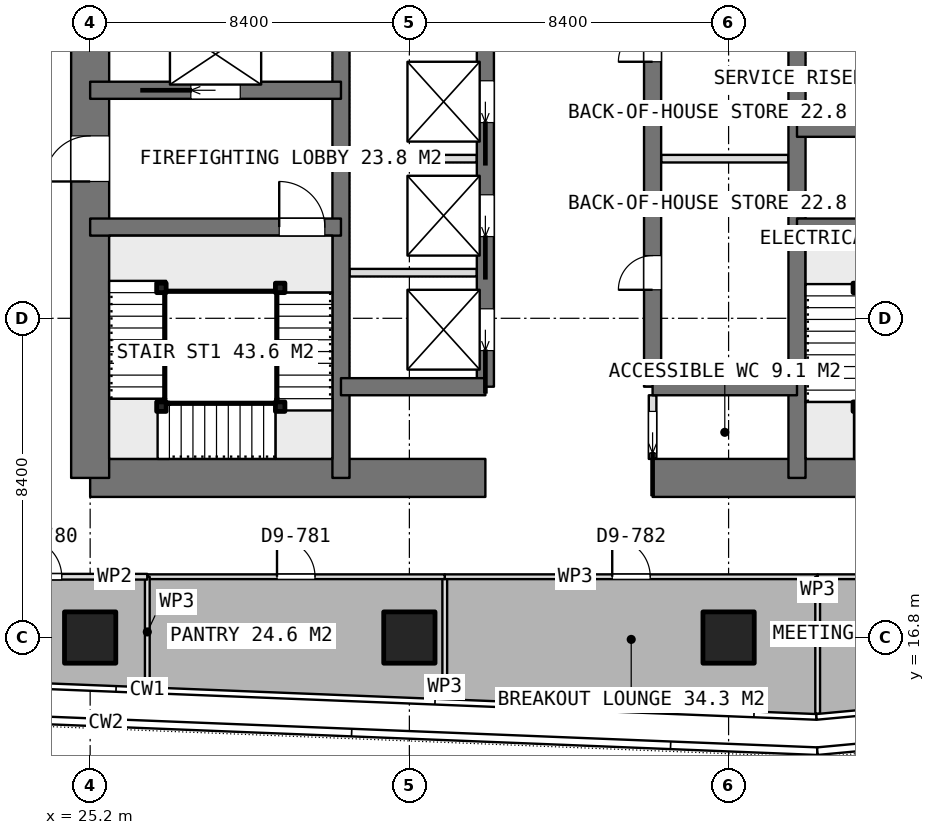
"""IFC4 building model, lengths in metres.
Left out: names, types, materials, properties, quantities, classifications, styles, units other than length and angle.
Written with IfcOpenShell. Run it as: python <this file> out.ifc"""

import sys

from ifc_helpers import new_model, si_unit, direction, frame, frame_2d, origin, origin_2d, place, context, subcontext, project, spatial, rectangle, extrude, element, fill, save


model = new_model("IFC4")
c1 = context("Model", 3, precision=1e-05, world=origin(), true_north=direction((0.0, 1.0)))
c2 = subcontext(c1, "Body", "Model", "MODEL_VIEW")
j1 = project(units=[si_unit("LENGTHUNIT", "METRE"), si_unit("PLANEANGLEUNIT", "RADIAN")], contexts=[c1])
p1 = place(None, origin())
s1 = spatial("IfcSite", under=j1, at=p1, CompositionType="ELEMENT")
p2 = place(p1, origin())
s2 = spatial("IfcBuilding", under=s1, at=p2, CompositionType="ELEMENT")
p3 = place(p2, frame((0.0, 0.0, 195.2)))
s3 = spatial("IfcBuildingStorey", under=s2, at=p3, CompositionType="ELEMENT", Elevation=195.2)
p4 = place(p3, frame((25.2, 21.0, 0.0), z_axis=(0.0, 0.0, 1.0), x_axis=(1.0, 0.0, 0.0)))
e1 = element("IfcWall", 1, at=p4, inside=s3, PredefinedType="SHEAR", context=c2, shape_type="SweptSolid", body=[
    extrude(rectangle(XDim=10.4, YDim=1.0, at=frame_2d((5.2, 0.0))), origin(), (0.0, 0.0, 1.0), 3.75),
])
p5 = place(p3, frame((40.0, 21.0, 0.0), z_axis=(0.0, 0.0, 1.0), x_axis=(1.0, 0.0, 0.0)))
e2 = element("IfcWall", 2, at=p5, inside=s3, PredefinedType="SHEAR", context=c2, shape_type="SweptSolid", body=[
    extrude(rectangle(XDim=10.4, YDim=1.0, at=frame_2d((5.2, 0.0))), origin(), (0.0, 0.0, 1.0), 3.75),
])
p6 = place(p3, frame((25.2, 21.0, 0.0), z_axis=(0.0, 0.0, 1.0), x_axis=(0.0, 1.0, 0.0)))
e3 = element("IfcWall", 3, at=p6, inside=s3, PredefinedType="SHEAR", context=c2, shape_type="SweptSolid", body=[
    extrude(rectangle(XDim=25.2, YDim=1.0, at=frame_2d((12.6, 0.0))), origin(), (0.0, 0.0, 1.0), 3.75),
])
p7 = place(p6, frame((7.8, 0.0, 0.0)))
e4 = element("IfcOpeningElement", 4, at=p7, cuts=e3, PredefinedType="OPENING", context=c2, shape_type="SweptSolid", body=[
    extrude(rectangle(XDim=1.2, YDim=2.1, at=frame_2d((0.6, 1.05))), frame((0.0, 0.51, 0.0), z_axis=(0.0, -1.0, 0.0), x_axis=(1.0, 0.0, 0.0)), (0.0, 0.0, 1.0), 1.02),
])
p8 = place(p6, frame((14.25, 0.0, 0.0)))
e5 = element("IfcOpeningElement", 5, at=p8, cuts=e3, PredefinedType="OPENING", context=c2, shape_type="SweptSolid", body=[
    extrude(rectangle(XDim=0.9, YDim=2.1, at=frame_2d((0.45, 1.05))), frame((0.0, 0.51, 0.0), z_axis=(0.0, -1.0, 0.0), x_axis=(1.0, 0.0, 0.0)), (0.0, 0.0, 1.0), 1.02),
])
p9 = place(p6, frame((16.85, 0.0, 0.0)))
e6 = element("IfcOpeningElement", 6, at=p9, cuts=e3, PredefinedType="OPENING", context=c2, shape_type="SweptSolid", body=[
    extrude(rectangle(XDim=0.9, YDim=2.1, at=frame_2d((0.45, 1.05))), frame((0.0, 0.51, 0.0), z_axis=(0.0, -1.0, 0.0), x_axis=(1.0, 0.0, 0.0)), (0.0, 0.0, 1.0), 1.02),
])
p10 = place(p6, frame((19.025, 0.0, 0.0)))
e7 = element("IfcOpeningElement", 7, at=p10, cuts=e3, PredefinedType="OPENING", context=c2, shape_type="SweptSolid", body=[
    extrude(rectangle(XDim=1.2, YDim=2.1, at=frame_2d((0.6, 1.05))), frame((0.0, 0.51, 0.0), z_axis=(0.0, -1.0, 0.0), x_axis=(1.0, 0.0, 0.0)), (0.0, 0.0, 1.0), 1.02),
])
for number, where, z_axis, x_axis in (
    (8, (31.8, 21.0, 0.0), (0.0, 0.0, 1.0), (0.0, 1.0, 0.0)),
    (9, (43.8, 21.0, 0.0), (0.0, 0.0, 1.0), (0.0, 1.0, 0.0)),
):
    element("IfcWall", number, at=place(p3, frame(where, z_axis=z_axis, x_axis=x_axis)), inside=s3, PredefinedType="SHEAR", context=c2, shape_type="SweptSolid", body=[
        extrude(rectangle(XDim=25.2, YDim=0.45, at=frame_2d((12.6, 0.0))), origin(), (0.0, 0.0, 1.0), 3.75),
    ])
p11 = place(p3, frame((35.6, 23.4, 0.0), z_axis=(0.0, 0.0, 1.0), x_axis=(0.0, 1.0, 0.0)))
e10 = element("IfcWall", 10, at=p11, inside=s3, PredefinedType="SHEAR", context=c2, shape_type="SweptSolid", body=[
    extrude(rectangle(XDim=18.0, YDim=0.45, at=frame_2d((9.0, 0.0))), origin(), (0.0, 0.0, 1.0), 3.75),
])
p12 = place(p11, frame((0.95, 0.0, 0.0)))
e11 = element("IfcOpeningElement", 11, at=p12, cuts=e10, PredefinedType="OPENING", context=c2, shape_type="SweptSolid", body=[
    extrude(rectangle(XDim=1.1, YDim=2.1, at=frame_2d((0.55, 1.05))), frame((0.0, 0.235, 0.0), z_axis=(0.0, -1.0, 0.0), x_axis=(1.0, 0.0, 0.0)), (0.0, 0.0, 1.0), 0.47),
])
p13 = place(p11, frame((3.95, 0.0, 0.0)))
e12 = element("IfcOpeningElement", 12, at=p13, cuts=e10, PredefinedType="OPENING", context=c2, shape_type="SweptSolid", body=[
    extrude(rectangle(XDim=1.1, YDim=2.1, at=frame_2d((0.55, 1.05))), frame((0.0, 0.235, 0.0), z_axis=(0.0, -1.0, 0.0), x_axis=(1.0, 0.0, 0.0)), (0.0, 0.0, 1.0), 0.47),
])
p14 = place(p11, frame((6.95, 0.0, 0.0)))
e13 = element("IfcOpeningElement", 13, at=p14, cuts=e10, PredefinedType="OPENING", context=c2, shape_type="SweptSolid", body=[
    extrude(rectangle(XDim=1.1, YDim=2.1, at=frame_2d((0.55, 1.05))), frame((0.0, 0.235, 0.0), z_axis=(0.0, -1.0, 0.0), x_axis=(1.0, 0.0, 0.0)), (0.0, 0.0, 1.0), 0.47),
])
p15 = place(p11, frame((9.95, 0.0, 0.0)))
e14 = element("IfcOpeningElement", 14, at=p15, cuts=e10, PredefinedType="OPENING", context=c2, shape_type="SweptSolid", body=[
    extrude(rectangle(XDim=1.1, YDim=2.1, at=frame_2d((0.55, 1.05))), frame((0.0, 0.235, 0.0), z_axis=(0.0, -1.0, 0.0), x_axis=(1.0, 0.0, 0.0)), (0.0, 0.0, 1.0), 0.47),
])
p16 = place(p11, frame((12.95, 0.0, 0.0)))
e15 = element("IfcOpeningElement", 15, at=p16, cuts=e10, PredefinedType="OPENING", context=c2, shape_type="SweptSolid", body=[
    extrude(rectangle(XDim=1.1, YDim=2.1, at=frame_2d((0.55, 1.05))), frame((0.0, 0.235, 0.0), z_axis=(0.0, -1.0, 0.0), x_axis=(1.0, 0.0, 0.0)), (0.0, 0.0, 1.0), 0.47),
])
p17 = place(p11, frame((15.95, 0.0, 0.0)))
e16 = element("IfcOpeningElement", 16, at=p17, cuts=e10, PredefinedType="OPENING", context=c2, shape_type="SweptSolid", body=[
    extrude(rectangle(XDim=1.1, YDim=2.1, at=frame_2d((0.55, 1.05))), frame((0.0, 0.235, 0.0), z_axis=(0.0, -1.0, 0.0), x_axis=(1.0, 0.0, 0.0)), (0.0, 0.0, 1.0), 0.47),
])
p18 = place(p3, frame((40.0, 23.4, 0.0), z_axis=(0.0, 0.0, 1.0), x_axis=(0.0, 1.0, 0.0)))
e17 = element("IfcWall", 17, at=p18, inside=s3, PredefinedType="SHEAR", context=c2, shape_type="SweptSolid", body=[
    extrude(rectangle(XDim=18.0, YDim=0.45, at=frame_2d((9.0, 0.0))), origin(), (0.0, 0.0, 1.0), 3.75),
])
p19 = place(p18, frame((2.55, 0.0, 0.0)))
e18 = element("IfcOpeningElement", 18, at=p19, cuts=e17, PredefinedType="OPENING", context=c2, shape_type="SweptSolid", body=[
    extrude(rectangle(XDim=0.9, YDim=2.1, at=frame_2d((0.45, 1.05))), frame((0.0, 0.235, 0.0), z_axis=(0.0, -1.0, 0.0), x_axis=(1.0, 0.0, 0.0)), (0.0, 0.0, 1.0), 0.47),
])
p20 = place(p18, frame((8.55, 0.0, 0.0)))
e19 = element("IfcOpeningElement", 19, at=p20, cuts=e17, PredefinedType="OPENING", context=c2, shape_type="SweptSolid", body=[
    extrude(rectangle(XDim=0.9, YDim=2.1, at=frame_2d((0.45, 1.05))), frame((0.0, 0.235, 0.0), z_axis=(0.0, -1.0, 0.0), x_axis=(1.0, 0.0, 0.0)), (0.0, 0.0, 1.0), 0.47),
])
for number, where, z_axis, x_axis in (
    (20, (31.8, 23.4, 0.0), (0.0, 0.0, 1.0), (1.0, 0.0, 0.0)),
    (21, (40.0, 23.4, 0.0), (0.0, 0.0, 1.0), (1.0, 0.0, 0.0)),
):
    element("IfcWall", number, at=place(p3, frame(where, z_axis=z_axis, x_axis=x_axis)), inside=s3, PredefinedType="SHEAR", context=c2, shape_type="SweptSolid", body=[
        extrude(rectangle(XDim=3.8, YDim=0.45, at=frame_2d((1.9, 0.0))), origin(), (0.0, 0.0, 1.0), 3.75),
    ])
p21 = place(p3, frame((25.2, 27.6, 0.0), z_axis=(0.0, 0.0, 1.0), x_axis=(1.0, 0.0, 0.0)))
e22 = element("IfcWall", 22, at=p21, inside=s3, PredefinedType="SHEAR", context=c2, shape_type="SweptSolid", body=[
    extrude(rectangle(XDim=6.6, YDim=0.45, at=frame_2d((3.3, 0.0))), origin(), (0.0, 0.0, 1.0), 3.75),
])
p22 = place(p21, frame((4.975, 0.0, 0.0)))
e23 = element("IfcOpeningElement", 23, at=p22, cuts=e22, PredefinedType="OPENING", context=c2, shape_type="SweptSolid", body=[
    extrude(rectangle(XDim=1.2, YDim=2.1, at=frame_2d((0.6, 1.05))), frame((0.0, 0.235, 0.0), z_axis=(0.0, -1.0, 0.0), x_axis=(1.0, 0.0, 0.0)), (0.0, 0.0, 1.0), 0.47),
])
p23 = place(p3, frame((25.2, 31.2, 0.0), z_axis=(0.0, 0.0, 1.0), x_axis=(1.0, 0.0, 0.0)))
e24 = element("IfcWall", 24, at=p23, inside=s3, PredefinedType="SHEAR", context=c2, shape_type="SweptSolid", body=[
    extrude(rectangle(XDim=6.6, YDim=0.45, at=frame_2d((3.3, 0.0))), origin(), (0.0, 0.0, 1.0), 3.75),
])
p24 = place(p23, frame((2.65, 0.0, 0.0)))
e25 = element("IfcOpeningElement", 25, at=p24, cuts=e24, PredefinedType="OPENING", context=c2, shape_type="SweptSolid", body=[
    extrude(rectangle(XDim=1.3, YDim=2.1, at=frame_2d((0.65, 1.05))), frame((0.0, 0.235, 0.0), z_axis=(0.0, -1.0, 0.0), x_axis=(1.0, 0.0, 0.0)), (0.0, 0.0, 1.0), 0.47),
])
for number, where, z_axis, x_axis in (
    (26, (43.8, 27.6, 0.0), (0.0, 0.0, 1.0), (1.0, 0.0, 0.0)),
    (27, (43.8, 30.2, 0.0), (0.0, 0.0, 1.0), (1.0, 0.0, 0.0)),
):
    element("IfcWall", number, at=place(p3, frame(where, z_axis=z_axis, x_axis=x_axis)), inside=s3, PredefinedType="SHEAR", context=c2, shape_type="SweptSolid", body=[
        extrude(rectangle(XDim=6.6, YDim=0.45, at=frame_2d((3.3, 0.0))), origin(), (0.0, 0.0, 1.0), 3.75),
    ])
for number, where, z_axis, x_axis in (
    (28, (25.2, 16.8, 0.0), (0.0, 0.0, 1.0), (1.0, 0.0, 0.0)),
    (29, (33.6, 16.8, 0.0), (0.0, 0.0, 1.0), (1.0, 0.0, 0.0)),
    (30, (42.0, 16.8, 0.0), (0.0, 0.0, 1.0), (1.0, 0.0, 0.0)),
):
    element("IfcColumn", number, at=place(p3, frame(where, z_axis=z_axis, x_axis=x_axis)), inside=s3, PredefinedType="COLUMN", context=c2, shape_type="SweptSolid", body=[
        extrude(rectangle(XDim=1.35, YDim=1.35, at=origin_2d()), origin(), (0.0, 0.0, 1.0), 3.75),
    ])
for number, where, z_axis, x_axis in (
    (31, (32.025, 26.4, 0.0), (0.0, 0.0, 1.0), (1.0, 0.0, 0.0)),
    (32, (32.025, 29.4, 0.0), (0.0, 0.0, 1.0), (1.0, 0.0, 0.0)),
):
    element("IfcWall", number, at=place(p3, frame(where, z_axis=z_axis, x_axis=x_axis)), inside=s3, PredefinedType="PARTITIONING", context=c2, shape_type="SweptSolid", body=[
        extrude(rectangle(XDim=3.35, YDim=0.2, at=frame_2d((1.675, 0.0))), origin(), (0.0, 0.0, 1.0), 3.5),
    ])
p25 = place(p3, frame((40.225, 29.4, 0.0), z_axis=(0.0, 0.0, 1.0), x_axis=(1.0, 0.0, 0.0)))
e33 = element("IfcWall", 33, at=p25, inside=s3, PredefinedType="PARTITIONING", context=c2, shape_type="SweptSolid", body=[
    extrude(rectangle(XDim=3.35, YDim=0.2, at=frame_2d((1.675, 0.0))), origin(), (0.0, 0.0, 1.0), 3.5),
])
p26 = place(p3, frame((40.0, 21.5, 0.0), z_axis=(0.0, 0.0, 1.0), x_axis=(0.0, 1.0, 0.0)))
e34 = element("IfcWall", 34, at=p26, inside=s3, PredefinedType="PARTITIONING", context=c2, shape_type="SweptSolid", body=[
    extrude(rectangle(XDim=1.675, YDim=0.2, at=frame_2d((0.837, 0.0))), origin(), (0.0, 0.0, 1.0), 3.5),
])
p27 = place(p26, frame((0.15, 0.0, 0.0)))
e35 = element("IfcOpeningElement", 35, at=p27, cuts=e34, PredefinedType="OPENING", context=c2, shape_type="SweptSolid", body=[
    extrude(rectangle(XDim=1.1, YDim=2.1, at=frame_2d((0.55, 1.05))), frame((0.0, 0.11, 0.0), z_axis=(0.0, -1.0, 0.0), x_axis=(1.0, 0.0, 0.0)), (0.0, 0.0, 1.0), 0.22),
])
p28 = place(p3, frame((34.531, 15.182, 0.0), z_axis=(0.0, 0.0, 1.0), x_axis=(0.0, 1.0, 0.0)))
e36 = element("IfcWall", 36, at=p28, inside=s3, PredefinedType="PARTITIONING", context=c2, shape_type="SweptSolid", body=[
    extrude(rectangle(XDim=3.218, YDim=0.125, at=frame_2d((1.609, 0.0))), origin(), (0.0, 0.0, 1.0), 3.5),
])
p29 = place(p3, frame((34.531, 18.4, 0.0), z_axis=(0.0, 0.0, 1.0), x_axis=(1.0, 0.0, 0.0)))
e37 = element("IfcWall", 37, at=p29, inside=s3, PredefinedType="PARTITIONING", context=c2, shape_type="SweptSolid", body=[
    extrude(rectangle(XDim=9.813, YDim=0.125, at=frame_2d((4.906, 0.0))), origin(), (0.0, 0.0, 1.0), 3.5),
])
p30 = place(p29, frame((4.407, 0.0, 0.0)))
e38 = element("IfcOpeningElement", 38, at=p30, cuts=e37, PredefinedType="OPENING", context=c2, shape_type="SweptSolid", body=[
    extrude(rectangle(XDim=1.0, YDim=2.1, at=frame_2d((0.5, 1.05))), frame((0.0, 0.073, 0.0), z_axis=(0.0, -1.0, 0.0), x_axis=(1.0, 0.0, 0.0)), (0.0, 0.0, 1.0), 0.145),
])
p31 = place(p3, frame((44.344, 18.4, 0.0), z_axis=(0.0, 0.0, 1.0), x_axis=(0.0, -1.0, 0.0)))
e39 = element("IfcWall", 39, at=p31, inside=s3, PredefinedType="PARTITIONING", context=c2, shape_type="SweptSolid", body=[
    extrude(rectangle(XDim=3.605, YDim=0.125, at=frame_2d((1.802, 0.0))), origin(), (0.0, 0.0, 1.0), 3.5),
])
p32 = place(p3, frame((44.345, 18.4, 0.0), z_axis=(0.0, 0.0, 1.0), x_axis=(1.0, 0.0, 0.0)))
e40 = element("IfcWall", 40, at=p32, inside=s3, PredefinedType="PARTITIONING", context=c2, shape_type="SweptSolid", body=[
    extrude(rectangle(XDim=6.945, YDim=0.125, at=frame_2d((3.473, 0.0))), origin(), (0.0, 0.0, 1.0), 3.5),
])
p33 = place(p32, frame((2.972, 0.0, 0.0)))
e41 = element("IfcOpeningElement", 41, at=p33, cuts=e40, PredefinedType="OPENING", context=c2, shape_type="SweptSolid", body=[
    extrude(rectangle(XDim=1.0, YDim=2.1, at=frame_2d((0.5, 1.05))), frame((0.0, 0.073, 0.0), z_axis=(0.0, -1.0, 0.0), x_axis=(1.0, 0.0, 0.0)), (0.0, 0.0, 1.0), 0.145),
])
p34 = place(p3, frame((26.704, 18.4, 0.0), z_axis=(0.0, 0.0, 1.0), x_axis=(1.0, 0.0, 0.0)))
e42 = element("IfcWall", 42, at=p34, inside=s3, PredefinedType="PARTITIONING", context=c2, shape_type="SweptSolid", body=[
    extrude(rectangle(XDim=7.826, YDim=0.125, at=frame_2d((3.913, 0.0))), origin(), (0.0, 0.0, 1.0), 3.5),
])
p35 = place(p34, frame((3.413, 0.0, 0.0)))
e43 = element("IfcOpeningElement", 43, at=p35, cuts=e42, PredefinedType="OPENING", context=c2, shape_type="SweptSolid", body=[
    extrude(rectangle(XDim=1.0, YDim=2.1, at=frame_2d((0.5, 1.05))), frame((0.0, 0.073, 0.0), z_axis=(0.0, -1.0, 0.0), x_axis=(1.0, 0.0, 0.0)), (0.0, 0.0, 1.0), 0.145),
])
p36 = place(p3, frame((26.704, 15.495, 0.0), z_axis=(0.0, 0.0, 1.0), x_axis=(0.0, 1.0, 0.0)))
e44 = element("IfcWall", 44, at=p36, inside=s3, PredefinedType="PARTITIONING", context=c2, shape_type="SweptSolid", body=[
    extrude(rectangle(XDim=2.905, YDim=0.125, at=frame_2d((1.452, 0.0))), origin(), (0.0, 0.0, 1.0), 3.5),
])
p37 = place(p3, frame((22.4, 18.4, 0.0), z_axis=(0.0, 0.0, 1.0), x_axis=(1.0, 0.0, 0.0)))
e45 = element("IfcWall", 45, at=p37, inside=s3, PredefinedType="PARTITIONING", context=c2, shape_type="SweptSolid", body=[
    extrude(rectangle(XDim=4.303, YDim=0.15, at=frame_2d((2.151, 0.0))), origin(), (0.0, 0.0, 1.0), 3.5),
])
p38 = place(p37, frame((1.052, 0.0, 0.0)))
e46 = element("IfcOpeningElement", 46, at=p38, cuts=e45, PredefinedType="OPENING", context=c2, shape_type="SweptSolid", body=[
    extrude(rectangle(XDim=1.0, YDim=2.1, at=frame_2d((0.5, 1.05))), frame((0.0, 0.085, 0.0), z_axis=(0.0, -1.0, 0.0), x_axis=(1.0, 0.0, 0.0)), (0.0, 0.0, 1.0), 0.17),
])
for number, where, z_axis, x_axis in (
    (47, (30.2, 26.0, 0.0), (0.0, 0.0, 1.0), (1.0, 0.0, 0.0)),
    (48, (30.2, 22.875, 0.0), (0.0, 0.0, 1.0), (1.0, 0.0, 0.0)),
    (49, (27.075, 22.875, 0.0), (0.0, 0.0, 1.0), (1.0, 0.0, 0.0)),
    (50, (27.075, 26.0, 0.0), (0.0, 0.0, 1.0), (1.0, 0.0, 0.0)),
    (51, (45.4, 22.875, 0.0), (0.0, 0.0, 1.0), (1.0, 0.0, 0.0)),
    (52, (45.4, 26.0, 0.0), (0.0, 0.0, 1.0), (1.0, 0.0, 0.0)),
):
    element("IfcColumn", number, at=place(p3, frame(where, z_axis=z_axis, x_axis=x_axis)), inside=s3, PredefinedType="COLUMN", context=c2, shape_type="SweptSolid", body=[
        extrude(rectangle(XDim=0.25, YDim=0.25, at=origin_2d()), origin(), (0.0, 0.0, 1.0), 3.75),
    ])
p39 = place(p7, origin())
e53 = element("IfcDoor", 53, at=p39, inside=s3, OperationType="SINGLE_SWING_LEFT", PredefinedType="DOOR", context=c2, shape_type="SweptSolid", body=[
    extrude(rectangle(XDim=1.2, YDim=2.1, at=frame_2d((0.6, 1.05))), frame((0.0, 0.025, 0.0), z_axis=(0.0, -1.0, 0.0), x_axis=(1.0, 0.0, 0.0)), (0.0, 0.0, 1.0), 0.05),
])
fill(e4, e53)
p40 = place(p27, origin())
e54 = element("IfcDoor", 54, at=p40, inside=s3, OperationType="SLIDING_TO_LEFT", PredefinedType="DOOR", context=c2, shape_type="SweptSolid", body=[
    extrude(rectangle(XDim=1.1, YDim=2.1, at=frame_2d((0.55, 1.05))), frame((0.0, 0.025, 0.0), z_axis=(0.0, -1.0, 0.0), x_axis=(1.0, 0.0, 0.0)), (0.0, 0.0, 1.0), 0.05),
])
fill(e35, e54)
p41 = place(p19, origin())
e55 = element("IfcDoor", 55, at=p41, inside=s3, OperationType="SINGLE_SWING_LEFT", PredefinedType="DOOR", context=c2, shape_type="SweptSolid", body=[
    extrude(rectangle(XDim=0.9, YDim=2.1, at=frame_2d((0.45, 1.05))), frame((0.0, 0.025, 0.0), z_axis=(0.0, -1.0, 0.0), x_axis=(1.0, 0.0, 0.0)), (0.0, 0.0, 1.0), 0.05),
])
fill(e18, e55)
p42 = place(p20, origin())
e56 = element("IfcDoor", 56, at=p42, inside=s3, OperationType="SINGLE_SWING_LEFT", PredefinedType="DOOR", context=c2, shape_type="SweptSolid", body=[
    extrude(rectangle(XDim=0.9, YDim=2.1, at=frame_2d((0.45, 1.05))), frame((0.0, 0.025, 0.0), z_axis=(0.0, -1.0, 0.0), x_axis=(1.0, 0.0, 0.0)), (0.0, 0.0, 1.0), 0.05),
])
fill(e19, e56)
p43 = place(p12, origin())
e57 = element("IfcDoor", 57, at=p43, inside=s3, OperationType="SLIDING_TO_LEFT", PredefinedType="USERDEFINED", context=c2, shape_type="SweptSolid", body=[
    extrude(rectangle(XDim=1.1, YDim=2.1, at=frame_2d((0.55, 1.05))), frame((0.0, 0.025, 0.0), z_axis=(0.0, -1.0, 0.0), x_axis=(1.0, 0.0, 0.0)), (0.0, 0.0, 1.0), 0.05),
])
fill(e11, e57)
p44 = place(p13, origin())
e58 = element("IfcDoor", 58, at=p44, inside=s3, OperationType="SLIDING_TO_LEFT", PredefinedType="USERDEFINED", context=c2, shape_type="SweptSolid", body=[
    extrude(rectangle(XDim=1.1, YDim=2.1, at=frame_2d((0.55, 1.05))), frame((0.0, 0.025, 0.0), z_axis=(0.0, -1.0, 0.0), x_axis=(1.0, 0.0, 0.0)), (0.0, 0.0, 1.0), 0.05),
])
fill(e12, e58)
p45 = place(p14, origin())
e59 = element("IfcDoor", 59, at=p45, inside=s3, OperationType="SLIDING_TO_LEFT", PredefinedType="USERDEFINED", context=c2, shape_type="SweptSolid", body=[
    extrude(rectangle(XDim=1.1, YDim=2.1, at=frame_2d((0.55, 1.05))), frame((0.0, 0.025, 0.0), z_axis=(0.0, -1.0, 0.0), x_axis=(1.0, 0.0, 0.0)), (0.0, 0.0, 1.0), 0.05),
])
fill(e13, e59)
p46 = place(p24, origin())
e60 = element("IfcDoor", 60, at=p46, inside=s3, OperationType="SLIDING_TO_LEFT", PredefinedType="USERDEFINED", context=c2, shape_type="SweptSolid", body=[
    extrude(rectangle(XDim=1.3, YDim=2.1, at=frame_2d((0.65, 1.05))), frame((0.0, 0.025, 0.0), z_axis=(0.0, -1.0, 0.0), x_axis=(1.0, 0.0, 0.0)), (0.0, 0.0, 1.0), 0.05),
])
fill(e25, e60)
p47 = place(p30, origin())
e61 = element("IfcDoor", 61, at=p47, inside=s3, OperationType="SINGLE_SWING_LEFT", PredefinedType="DOOR", context=c2, shape_type="SweptSolid", body=[
    extrude(rectangle(XDim=1.0, YDim=2.1, at=frame_2d((0.5, 1.05))), frame((0.0, 0.025, 0.0), z_axis=(0.0, -1.0, 0.0), x_axis=(1.0, 0.0, 0.0)), (0.0, 0.0, 1.0), 0.05),
])
fill(e38, e61)
p48 = place(p35, origin())
e62 = element("IfcDoor", 62, at=p48, inside=s3, OperationType="SINGLE_SWING_LEFT", PredefinedType="DOOR", context=c2, shape_type="SweptSolid", body=[
    extrude(rectangle(XDim=1.0, YDim=2.1, at=frame_2d((0.5, 1.05))), frame((0.0, 0.025, 0.0), z_axis=(0.0, -1.0, 0.0), x_axis=(1.0, 0.0, 0.0)), (0.0, 0.0, 1.0), 0.05),
])
fill(e43, e62)
p49 = place(p38, origin())
e63 = element("IfcDoor", 63, at=p49, inside=s3, OperationType="SINGLE_SWING_LEFT", PredefinedType="DOOR", context=c2, shape_type="SweptSolid", body=[
    extrude(rectangle(XDim=1.0, YDim=2.1, at=frame_2d((0.5, 1.05))), frame((0.0, 0.025, 0.0), z_axis=(0.0, -1.0, 0.0), x_axis=(1.0, 0.0, 0.0)), (0.0, 0.0, 1.0), 0.05),
])
fill(e46, e63)
p50 = place(p22, origin())
e64 = element("IfcDoor", 64, at=p50, inside=s3, OperationType="SINGLE_SWING_RIGHT", PredefinedType="DOOR", context=c2, shape_type="SweptSolid", body=[
    extrude(rectangle(XDim=1.2, YDim=2.1, at=frame_2d((0.6, 1.05))), frame((0.0, 0.025, 0.0), z_axis=(0.0, -1.0, 0.0), x_axis=(1.0, 0.0, 0.0)), (0.0, 0.0, 1.0), 0.05),
])
fill(e23, e64)
save(model, sys.argv[1])
